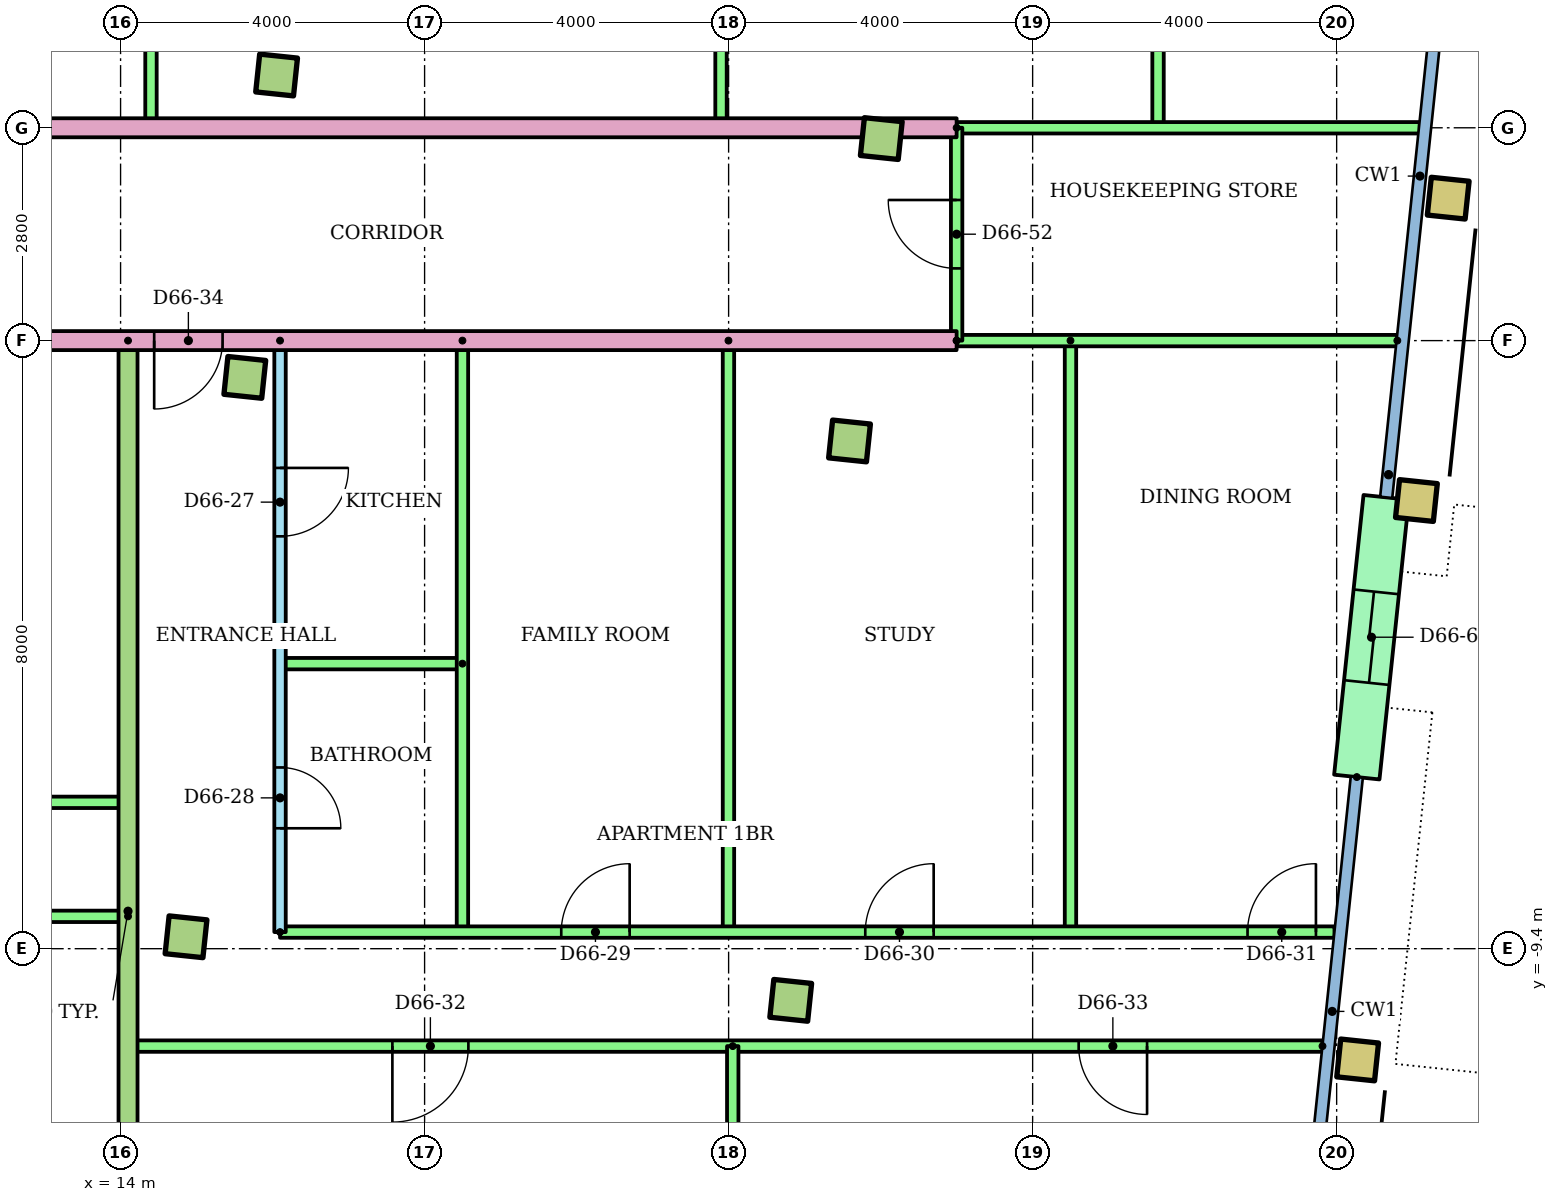
"""IFC4 building model, lengths in metres.
Left out: names, types, materials, properties, quantities, classifications, styles, units other than length and angle.
Written with IfcOpenShell. Run it as: python <this file> out.ifc"""

import sys

from ifc_helpers import new_model, si_unit, direction, frame, frame_2d, origin, origin_2d, place, context, subcontext, project, spatial, rectangle, hollow_rectangle, extrude, element, fill, save


model = new_model("IFC4")
c1 = context("Model", 3, precision=1e-05, world=origin(), true_north=direction((0.0, 1.0)))
c2 = subcontext(c1, "Body", "Model", "MODEL_VIEW")
j1 = project(units=[si_unit("LENGTHUNIT", "METRE"), si_unit("PLANEANGLEUNIT", "RADIAN")], contexts=[c1])
p1 = place(None, origin())
s1 = spatial("IfcSite", under=j1, at=p1, CompositionType="ELEMENT")
p2 = place(p1, origin())
s2 = spatial("IfcBuilding", under=s1, at=p2, CompositionType="ELEMENT")
p3 = place(p2, frame((0.0, 0.0, 256.3)))
s3 = spatial("IfcBuildingStorey", under=s2, at=p3, CompositionType="ELEMENT", Elevation=256.3)
for number, where, z_axis, x_axis in (
    (1, (14.861, -9.243, 0.0), (0.0, 0.0, 1.0), (0.995, -0.105, 0.0)),
    (2, (22.817, -10.08, 0.0), (0.0, 0.0, 1.0), (0.995, -0.105, 0.0)),
):
    element("IfcColumn", number, at=place(p3, frame(where, z_axis=z_axis, x_axis=x_axis)), inside=s3, PredefinedType="COLUMN", context=c2, shape_type="SweptSolid", body=[
        extrude(rectangle(XDim=0.5, YDim=0.5, at=origin_2d()), origin(), (0.0, 0.0, 1.0), 3.2),
    ])
p4 = place(p3, frame((30.276, -10.864, 0.0), z_axis=(0.0, 0.0, 1.0), x_axis=(0.994521895368, -0.104528463268, 0.0)))
e3 = element("IfcColumn", 3, at=p4, inside=s3, PredefinedType="COLUMN", context=c2, shape_type="SweptSolid", body=[
    extrude(hollow_rectangle(XDim=0.5, YDim=0.5, WallThickness=0.025, at=origin_2d()), origin(), (0.0, 0.0, 1.0), 3.2),
])
for number, where, z_axis, x_axis in (
    (4, (15.635, -1.884, 0.0), (0.0, 0.0, 1.0), (0.995, -0.105, 0.0)),
    (5, (23.591, -2.72, 0.0), (0.0, 0.0, 1.0), (0.995, -0.105, 0.0)),
):
    element("IfcColumn", number, at=place(p3, frame(where, z_axis=z_axis, x_axis=x_axis)), inside=s3, PredefinedType="COLUMN", context=c2, shape_type="SweptSolid", body=[
        extrude(rectangle(XDim=0.5, YDim=0.5, at=origin_2d()), origin(), (0.0, 0.0, 1.0), 3.2),
    ])
p5 = place(p3, frame((31.05, -3.504, 0.0), z_axis=(0.0, 0.0, 1.0), x_axis=(0.994521895368, -0.104528463268, 0.0)))
e6 = element("IfcColumn", 6, at=p5, inside=s3, PredefinedType="COLUMN", context=c2, shape_type="SweptSolid", body=[
    extrude(hollow_rectangle(XDim=0.5, YDim=0.5, WallThickness=0.025, at=origin_2d()), origin(), (0.0, 0.0, 1.0), 3.2),
])
for number, where, z_axis, x_axis in (
    (7, (16.053, 2.094, 0.0), (0.0, 0.0, 1.0), (0.995, -0.105, 0.0)),
    (8, (24.009, 1.258, 0.0), (0.0, 0.0, 1.0), (0.995, -0.105, 0.0)),
):
    element("IfcColumn", number, at=place(p3, frame(where, z_axis=z_axis, x_axis=x_axis)), inside=s3, PredefinedType="COLUMN", context=c2, shape_type="SweptSolid", body=[
        extrude(rectangle(XDim=0.5, YDim=0.5, at=origin_2d()), origin(), (0.0, 0.0, 1.0), 3.2),
    ])
p6 = place(p3, frame((31.468, 0.474, 0.0), z_axis=(0.0, 0.0, 1.0), x_axis=(0.994521895368, -0.104528463268, 0.0)))
e9 = element("IfcColumn", 9, at=p6, inside=s3, PredefinedType="COLUMN", context=c2, shape_type="SweptSolid", body=[
    extrude(hollow_rectangle(XDim=0.5, YDim=0.5, WallThickness=0.025, at=origin_2d()), origin(), (0.0, 0.0, 1.0), 3.2),
])
p7 = place(p3, frame((30.265, -7.142, 0.0), z_axis=(0.0, 0.0, 1.0), x_axis=(0.104513052986, 0.994523514933, 0.0)))
e10 = element("IfcWall", 10, at=p7, inside=s3, PredefinedType="STANDARD", context=c2, shape_type="SweptSolid", body=[
    extrude(rectangle(XDim=3.7, YDim=0.6, at=frame_2d((1.85, 0.0))), origin(), (0.0, 0.0, 1.0), 2.92),
])
p8 = place(p7, frame((1.25, 0.0, 0.0)))
e11 = element("IfcOpeningElement", 11, at=p8, cuts=e10, PredefinedType="OPENING", context=c2, shape_type="SweptSolid", body=[
    extrude(rectangle(XDim=1.2, YDim=2.1, at=frame_2d((0.6, 1.05))), frame((0.0, 0.31, 0.0), z_axis=(0.0, -1.0, 0.0), x_axis=(1.0, 0.0, 0.0)), (0.0, 0.0, 1.0), 0.62),
])
p9 = place(p3, frame((-7.77, -7.475, 0.0)))
e12 = element("IfcWall", 12, at=p9, inside=s3, PredefinedType="PARTITIONING", context=c2, shape_type="SweptSolid", body=[
    extrude(rectangle(XDim=21.868, YDim=0.15, at=frame_2d((10.934, 0.0))), origin(), (0.0, 0.0, 1.0), 2.4),
])
p10 = place(p9, frame((5.414, 0.0, 0.0)))
e13 = element("IfcOpeningElement", 13, at=p10, cuts=e12, PredefinedType="OPENING", context=c2, shape_type="SweptSolid", body=[
    extrude(rectangle(XDim=0.9, YDim=2.1, at=frame_2d((0.45, 1.05))), frame((0.0, 0.085, 0.0), z_axis=(0.0, -1.0, 0.0), x_axis=(1.0, 0.0, 0.0)), (0.0, 0.0, 1.0), 0.17),
])
p11 = place(p9, frame((13.37, 0.0, 0.0)))
e14 = element("IfcOpeningElement", 14, at=p11, cuts=e12, PredefinedType="OPENING", context=c2, shape_type="SweptSolid", body=[
    extrude(rectangle(XDim=0.9, YDim=2.1, at=frame_2d((0.45, 1.05))), frame((0.0, 0.085, 0.0), z_axis=(0.0, -1.0, 0.0), x_axis=(1.0, 0.0, 0.0)), (0.0, 0.0, 1.0), 0.17),
])
p12 = place(p9, frame((19.059, 0.0, 0.0)))
e15 = element("IfcOpeningElement", 15, at=p12, cuts=e12, PredefinedType="OPENING", context=c2, shape_type="SweptSolid", body=[
    extrude(rectangle(XDim=0.9, YDim=2.1, at=frame_2d((0.45, 1.05))), frame((0.0, 0.085, 0.0), z_axis=(0.0, -1.0, 0.0), x_axis=(1.0, 0.0, 0.0)), (0.0, 0.0, 1.0), 0.17),
])
p13 = place(p3, frame((14.098, -8.975, 0.0), z_axis=(0.0, 0.0, 1.0), x_axis=(-1.0, 0.0, 0.0)))
e16 = element("IfcWall", 16, at=p13, inside=s3, PredefinedType="PARTITIONING", context=c2, shape_type="SweptSolid", body=[
    extrude(rectangle(XDim=23.868, YDim=0.15, at=frame_2d((11.934, 0.0))), origin(), (0.0, 0.0, 1.0), 2.4),
])
p14 = place(p13, frame((21.429, 0.0, 0.0)))
e17 = element("IfcOpeningElement", 17, at=p14, cuts=e16, PredefinedType="OPENING", context=c2, shape_type="SweptSolid", body=[
    extrude(rectangle(XDim=0.9, YDim=2.1, at=frame_2d((0.45, 1.05))), frame((0.0, 0.085, 0.0), z_axis=(0.0, -1.0, 0.0), x_axis=(1.0, 0.0, 0.0)), (0.0, 0.0, 1.0), 0.17),
])
p15 = place(p13, frame((17.451, 0.0, 0.0)))
e18 = element("IfcOpeningElement", 18, at=p15, cuts=e16, PredefinedType="OPENING", context=c2, shape_type="SweptSolid", body=[
    extrude(rectangle(XDim=0.9, YDim=2.1, at=frame_2d((0.45, 1.05))), frame((0.0, 0.085, 0.0), z_axis=(0.0, -1.0, 0.0), x_axis=(1.0, 0.0, 0.0)), (0.0, 0.0, 1.0), 0.17),
])
p16 = place(p13, frame((13.473, 0.0, 0.0)))
e19 = element("IfcOpeningElement", 19, at=p16, cuts=e16, PredefinedType="OPENING", context=c2, shape_type="SweptSolid", body=[
    extrude(rectangle(XDim=0.9, YDim=2.1, at=frame_2d((0.45, 1.05))), frame((0.0, 0.085, 0.0), z_axis=(0.0, -1.0, 0.0), x_axis=(1.0, 0.0, 0.0)), (0.0, 0.0, 1.0), 0.17),
])
p17 = place(p13, frame((9.495, 0.0, 0.0)))
e20 = element("IfcOpeningElement", 20, at=p17, cuts=e16, PredefinedType="OPENING", context=c2, shape_type="SweptSolid", body=[
    extrude(rectangle(XDim=0.9, YDim=2.1, at=frame_2d((0.45, 1.05))), frame((0.0, 0.085, 0.0), z_axis=(0.0, -1.0, 0.0), x_axis=(1.0, 0.0, 0.0)), (0.0, 0.0, 1.0), 0.17),
])
p18 = place(p13, frame((3.478, 0.0, 0.0)))
e21 = element("IfcOpeningElement", 21, at=p18, cuts=e16, PredefinedType="OPENING", context=c2, shape_type="SweptSolid", body=[
    extrude(rectangle(XDim=1.0, YDim=2.1, at=frame_2d((0.5, 1.05))), frame((0.0, 0.085, 0.0), z_axis=(0.0, -1.0, 0.0), x_axis=(1.0, 0.0, 0.0)), (0.0, 0.0, 1.0), 0.17),
])
p19 = place(p3, frame((16.098, -1.4, 0.0), z_axis=(0.0, 0.0, 1.0), x_axis=(0.0, -1.0, 0.0)))
e22 = element("IfcWall", 22, at=p19, inside=s3, PredefinedType="PARTITIONING", context=c2, shape_type="SweptSolid", body=[
    extrude(rectangle(XDim=7.782, YDim=0.15, at=frame_2d((3.891, 0.0))), origin(), (0.0, 0.0, 1.0), 2.4),
])
p20 = place(p19, frame((1.675, 0.0, 0.0)))
e23 = element("IfcOpeningElement", 23, at=p20, cuts=e22, PredefinedType="OPENING", context=c2, shape_type="SweptSolid", body=[
    extrude(rectangle(XDim=0.9, YDim=2.1, at=frame_2d((0.45, 1.05))), frame((0.0, 0.085, 0.0), z_axis=(0.0, -1.0, 0.0), x_axis=(1.0, 0.0, 0.0)), (0.0, 0.0, 1.0), 0.17),
])
p21 = place(p19, frame((5.616, 0.0, 0.0)))
e24 = element("IfcOpeningElement", 24, at=p21, cuts=e22, PredefinedType="OPENING", context=c2, shape_type="SweptSolid", body=[
    extrude(rectangle(XDim=0.8, YDim=2.1, at=frame_2d((0.4, 1.05))), frame((0.0, 0.085, 0.0), z_axis=(0.0, -1.0, 0.0), x_axis=(1.0, 0.0, 0.0)), (0.0, 0.0, 1.0), 0.17),
])
p22 = place(p3, frame((18.498, -5.65, 0.0), z_axis=(0.0, 0.0, 1.0), x_axis=(-1.0, 0.0, 0.0)))
e25 = element("IfcWall", 25, at=p22, inside=s3, PredefinedType="PARTITIONING", context=c2, shape_type="SweptSolid", body=[
    extrude(rectangle(XDim=2.4, YDim=0.15, at=frame_2d((1.2, 0.0))), origin(), (0.0, 0.0, 1.0), 2.4),
])
for number, where, z_axis, x_axis in (
    (26, (18.498, -1.4, 0.0), (0.0, 0.0, 1.0), (0.0, -1.0, 0.0)),
    (27, (21.998, -1.4, 0.0), (0.0, 0.0, 1.0), (0.0, -1.0, 0.0)),
    (28, (26.498, -1.4, 0.0), (0.0, 0.0, 1.0), (0.0, -1.0, 0.0)),
):
    element("IfcWall", number, at=place(p3, frame(where, z_axis=z_axis, x_axis=x_axis)), inside=s3, PredefinedType="PARTITIONING", context=c2, shape_type="SweptSolid", body=[
        extrude(rectangle(XDim=7.782, YDim=0.15, at=frame_2d((3.891, 0.0))), origin(), (0.0, 0.0, 1.0), 2.4),
    ])
p23 = place(p3, frame((16.098, -9.182, 0.0)))
e29 = element("IfcWall", 29, at=p23, inside=s3, PredefinedType="PARTITIONING", context=c2, shape_type="SweptSolid", body=[
    extrude(rectangle(XDim=13.873, YDim=0.15, at=frame_2d((6.937, 0.0))), origin(), (0.0, 0.0, 1.0), 2.4),
])
p24 = place(p23, frame((3.7, 0.0, 0.0)))
e30 = element("IfcOpeningElement", 30, at=p24, cuts=e29, PredefinedType="OPENING", context=c2, shape_type="SweptSolid", body=[
    extrude(rectangle(XDim=0.9, YDim=2.1, at=frame_2d((0.45, 1.05))), frame((0.0, 0.085, 0.0), z_axis=(0.0, -1.0, 0.0), x_axis=(1.0, 0.0, 0.0)), (0.0, 0.0, 1.0), 0.17),
])
p25 = place(p23, frame((7.7, 0.0, 0.0)))
e31 = element("IfcOpeningElement", 31, at=p25, cuts=e29, PredefinedType="OPENING", context=c2, shape_type="SweptSolid", body=[
    extrude(rectangle(XDim=0.9, YDim=2.1, at=frame_2d((0.45, 1.05))), frame((0.0, 0.085, 0.0), z_axis=(0.0, -1.0, 0.0), x_axis=(1.0, 0.0, 0.0)), (0.0, 0.0, 1.0), 0.17),
])
p26 = place(p23, frame((12.729, 0.0, 0.0)))
e32 = element("IfcOpeningElement", 32, at=p26, cuts=e29, PredefinedType="OPENING", context=c2, shape_type="SweptSolid", body=[
    extrude(rectangle(XDim=0.9, YDim=2.1, at=frame_2d((0.45, 1.05))), frame((0.0, 0.085, 0.0), z_axis=(0.0, -1.0, 0.0), x_axis=(1.0, 0.0, 0.0)), (0.0, 0.0, 1.0), 0.17),
])
p27 = place(p3, frame((29.814, -10.682, 0.0), z_axis=(0.0, 0.0, 1.0), x_axis=(-1.0, 0.0, 0.0)))
e33 = element("IfcWall", 33, at=p27, inside=s3, PredefinedType="PARTITIONING", context=c2, shape_type="SweptSolid", body=[
    extrude(rectangle(XDim=15.716, YDim=0.15, at=frame_2d((7.858, 0.0))), origin(), (0.0, 0.0, 1.0), 2.4),
])
p28 = place(p27, frame((11.238, 0.0, 0.0)))
e34 = element("IfcOpeningElement", 34, at=p28, cuts=e33, PredefinedType="OPENING", context=c2, shape_type="SweptSolid", body=[
    extrude(rectangle(XDim=1.0, YDim=2.1, at=frame_2d((0.5, 1.05))), frame((0.0, 0.085, 0.0), z_axis=(0.0, -1.0, 0.0), x_axis=(1.0, 0.0, 0.0)), (0.0, 0.0, 1.0), 0.17),
])
p29 = place(p27, frame((2.308, 0.0, 0.0)))
e35 = element("IfcOpeningElement", 35, at=p29, cuts=e33, PredefinedType="OPENING", context=c2, shape_type="SweptSolid", body=[
    extrude(rectangle(XDim=0.9, YDim=2.1, at=frame_2d((0.45, 1.05))), frame((0.0, 0.085, 0.0), z_axis=(0.0, -1.0, 0.0), x_axis=(1.0, 0.0, 0.0)), (0.0, 0.0, 1.0), 0.17),
])
p30 = place(p3, frame((22.054, -10.682, 0.0), z_axis=(0.0, 0.0, 1.0), x_axis=(0.0, -1.0, 0.0)))
e36 = element("IfcWall", 36, at=p30, inside=s3, PredefinedType="PARTITIONING", context=c2, shape_type="SweptSolid", body=[
    extrude(rectangle(XDim=6.567, YDim=0.15, at=frame_2d((3.284, 0.0))), origin(), (0.0, 0.0, 1.0), 2.4),
])
p31 = place(p3, frame((14.098, -1.4, 0.0), z_axis=(0.0, 0.0, 1.0), x_axis=(0.0, -1.0, 0.0)))
e37 = element("IfcWall", 37, at=p31, inside=s3, PredefinedType="PARTITIONING", context=c2, shape_type="SweptSolid", body=[
    extrude(rectangle(XDim=15.013, YDim=0.25, at=frame_2d((7.506, 0.0))), origin(), (0.0, 0.0, 1.0), 2.4),
])
p32 = place(p3, frame((25.0, -1.4, 0.0), z_axis=(0.0, 0.0, 1.0), x_axis=(-1.0, 0.0, 0.0)))
e38 = element("IfcWall", 38, at=p32, inside=s3, PredefinedType="PARTITIONING", context=c2, shape_type="SweptSolid", body=[
    extrude(rectangle(XDim=15.0, YDim=0.25, at=frame_2d((7.5, 0.0))), origin(), (0.0, 0.0, 1.0), 2.4),
])
p33 = place(p32, frame((9.658, 0.0, 0.0)))
e39 = element("IfcOpeningElement", 39, at=p33, cuts=e38, PredefinedType="OPENING", context=c2, shape_type="SweptSolid", body=[
    extrude(rectangle(XDim=0.9, YDim=2.1, at=frame_2d((0.45, 1.05))), frame((0.0, 0.135, 0.0), z_axis=(0.0, -1.0, 0.0), x_axis=(1.0, 0.0, 0.0)), (0.0, 0.0, 1.0), 0.27),
])
p34 = place(p3, frame((30.798, -1.4, 0.0), z_axis=(0.0, 0.0, 1.0), x_axis=(-1.0, 0.0, 0.0)))
e40 = element("IfcWall", 40, at=p34, inside=s3, PredefinedType="PARTITIONING", context=c2, shape_type="SweptSolid", body=[
    extrude(rectangle(XDim=5.798, YDim=0.15, at=frame_2d((2.899, 0.0))), origin(), (0.0, 0.0, 1.0), 2.4),
])
for number, where, z_axis, x_axis in (
    (41, (14.4, 10.943, 0.0), (0.0, 0.0, 1.0), (0.0, -1.0, 0.0)),
    (42, (21.9, 10.943, 0.0), (0.0, 0.0, 1.0), (0.0, -1.0, 0.0)),
    (43, (27.65, 10.943, 0.0), (0.0, 0.0, 1.0), (0.0, -1.0, 0.0)),
):
    element("IfcWall", number, at=place(p3, frame(where, z_axis=z_axis, x_axis=x_axis)), inside=s3, PredefinedType="PARTITIONING", context=c2, shape_type="SweptSolid", body=[
        extrude(rectangle(XDim=9.543, YDim=0.15, at=frame_2d((4.772, 0.0))), origin(), (0.0, 0.0, 1.0), 2.4),
    ])
p35 = place(p3, frame((10.0, 1.4, 0.0)))
e44 = element("IfcWall", 44, at=p35, inside=s3, PredefinedType="PARTITIONING", context=c2, shape_type="SweptSolid", body=[
    extrude(rectangle(XDim=15.0, YDim=0.25, at=frame_2d((7.5, 0.0))), origin(), (0.0, 0.0, 1.0), 2.4),
])
p36 = place(p35, frame((0.5, 0.0, 0.0)))
e45 = element("IfcOpeningElement", 45, at=p36, cuts=e44, PredefinedType="OPENING", context=c2, shape_type="SweptSolid", body=[
    extrude(rectangle(XDim=1.0, YDim=2.1, at=frame_2d((0.5, 1.05))), frame((0.0, 0.135, 0.0), z_axis=(0.0, -1.0, 0.0), x_axis=(1.0, 0.0, 0.0)), (0.0, 0.0, 1.0), 0.27),
])
p37 = place(p3, frame((25.0, 1.4, 0.0)))
e46 = element("IfcWall", 46, at=p37, inside=s3, PredefinedType="PARTITIONING", context=c2, shape_type="SweptSolid", body=[
    extrude(rectangle(XDim=6.093, YDim=0.15, at=frame_2d((3.046, 0.0))), origin(), (0.0, 0.0, 1.0), 2.4),
])
p38 = place(p3, frame((25.0, -1.4, 0.0), z_axis=(0.0, 0.0, 1.0), x_axis=(0.0, 1.0, 0.0)))
e47 = element("IfcWall", 47, at=p38, inside=s3, PredefinedType="PARTITIONING", context=c2, shape_type="SweptSolid", body=[
    extrude(rectangle(XDim=2.8, YDim=0.15, at=frame_2d((1.4, 0.0))), origin(), (0.0, 0.0, 1.0), 2.4),
])
p39 = place(p38, frame((0.95, 0.0, 0.0)))
e48 = element("IfcOpeningElement", 48, at=p39, cuts=e47, PredefinedType="OPENING", context=c2, shape_type="SweptSolid", body=[
    extrude(rectangle(XDim=0.9, YDim=2.1, at=frame_2d((0.45, 1.05))), frame((0.0, 0.085, 0.0), z_axis=(0.0, -1.0, 0.0), x_axis=(1.0, 0.0, 0.0)), (0.0, 0.0, 1.0), 0.17),
])
p40 = place(p20, origin())
e49 = element("IfcDoor", 49, at=p40, inside=s3, OperationType="SINGLE_SWING_LEFT", PredefinedType="DOOR", context=c2, shape_type="SweptSolid", body=[
    extrude(rectangle(XDim=0.9, YDim=2.1, at=frame_2d((0.45, 1.05))), frame((0.0, 0.025, 0.0), z_axis=(0.0, -1.0, 0.0), x_axis=(1.0, 0.0, 0.0)), (0.0, 0.0, 1.0), 0.05),
])
fill(e23, e49)
p41 = place(p21, origin())
e50 = element("IfcDoor", 50, at=p41, inside=s3, OperationType="SINGLE_SWING_RIGHT", PredefinedType="DOOR", context=c2, shape_type="SweptSolid", body=[
    extrude(rectangle(XDim=0.8, YDim=2.1, at=frame_2d((0.4, 1.05))), frame((0.0, 0.025, 0.0), z_axis=(0.0, -1.0, 0.0), x_axis=(1.0, 0.0, 0.0)), (0.0, 0.0, 1.0), 0.05),
])
fill(e24, e50)
p42 = place(p24, origin())
e51 = element("IfcDoor", 51, at=p42, inside=s3, OperationType="SINGLE_SWING_RIGHT", PredefinedType="DOOR", context=c2, shape_type="SweptSolid", body=[
    extrude(rectangle(XDim=0.9, YDim=2.1, at=frame_2d((0.45, 1.05))), frame((0.0, 0.025, 0.0), z_axis=(0.0, -1.0, 0.0), x_axis=(1.0, 0.0, 0.0)), (0.0, 0.0, 1.0), 0.05),
])
fill(e30, e51)
p43 = place(p25, origin())
e52 = element("IfcDoor", 52, at=p43, inside=s3, OperationType="SINGLE_SWING_RIGHT", PredefinedType="DOOR", context=c2, shape_type="SweptSolid", body=[
    extrude(rectangle(XDim=0.9, YDim=2.1, at=frame_2d((0.45, 1.05))), frame((0.0, 0.025, 0.0), z_axis=(0.0, -1.0, 0.0), x_axis=(1.0, 0.0, 0.0)), (0.0, 0.0, 1.0), 0.05),
])
fill(e31, e52)
p44 = place(p26, origin())
e53 = element("IfcDoor", 53, at=p44, inside=s3, OperationType="SINGLE_SWING_RIGHT", PredefinedType="DOOR", context=c2, shape_type="SweptSolid", body=[
    extrude(rectangle(XDim=0.9, YDim=2.1, at=frame_2d((0.45, 1.05))), frame((0.0, 0.025, 0.0), z_axis=(0.0, -1.0, 0.0), x_axis=(1.0, 0.0, 0.0)), (0.0, 0.0, 1.0), 0.05),
])
fill(e32, e53)
p45 = place(p28, origin())
e54 = element("IfcDoor", 54, at=p45, inside=s3, OperationType="SINGLE_SWING_RIGHT", PredefinedType="DOOR", context=c2, shape_type="SweptSolid", body=[
    extrude(rectangle(XDim=1.0, YDim=2.1, at=frame_2d((0.5, 1.05))), frame((0.0, 0.025, 0.0), z_axis=(0.0, -1.0, 0.0), x_axis=(1.0, 0.0, 0.0)), (0.0, 0.0, 1.0), 0.05),
])
fill(e34, e54)
p46 = place(p29, origin())
e55 = element("IfcDoor", 55, at=p46, inside=s3, OperationType="SINGLE_SWING_LEFT", PredefinedType="DOOR", context=c2, shape_type="SweptSolid", body=[
    extrude(rectangle(XDim=0.9, YDim=2.1, at=frame_2d((0.45, 1.05))), frame((0.0, 0.025, 0.0), z_axis=(0.0, -1.0, 0.0), x_axis=(1.0, 0.0, 0.0)), (0.0, 0.0, 1.0), 0.05),
])
fill(e35, e55)
p47 = place(p33, origin())
e56 = element("IfcDoor", 56, at=p47, inside=s3, OperationType="SINGLE_SWING_RIGHT", PredefinedType="DOOR", context=c2, shape_type="SweptSolid", body=[
    extrude(rectangle(XDim=0.9, YDim=2.1, at=frame_2d((0.45, 1.05))), frame((0.0, 0.025, 0.0), z_axis=(0.0, -1.0, 0.0), x_axis=(1.0, 0.0, 0.0)), (0.0, 0.0, 1.0), 0.05),
])
fill(e39, e56)
p48 = place(p39, origin())
e57 = element("IfcDoor", 57, at=p48, inside=s3, OperationType="SINGLE_SWING_RIGHT", PredefinedType="DOOR", context=c2, shape_type="SweptSolid", body=[
    extrude(rectangle(XDim=0.9, YDim=2.1, at=frame_2d((0.45, 1.05))), frame((0.0, 0.025, 0.0), z_axis=(0.0, -1.0, 0.0), x_axis=(1.0, 0.0, 0.0)), (0.0, 0.0, 1.0), 0.05),
])
fill(e48, e57)
p49 = place(p8, origin())
e58 = element("IfcDoor", 58, at=p49, inside=s3, OperationType="SLIDING_TO_LEFT", PredefinedType="DOOR", context=c2, shape_type="SweptSolid", body=[
    extrude(rectangle(XDim=1.2, YDim=2.1, at=frame_2d((0.6, 1.05))), frame((0.0, 0.025, 0.0), z_axis=(0.0, -1.0, 0.0), x_axis=(1.0, 0.0, 0.0)), (0.0, 0.0, 1.0), 0.05),
])
fill(e11, e58)
save(model, sys.argv[1])
